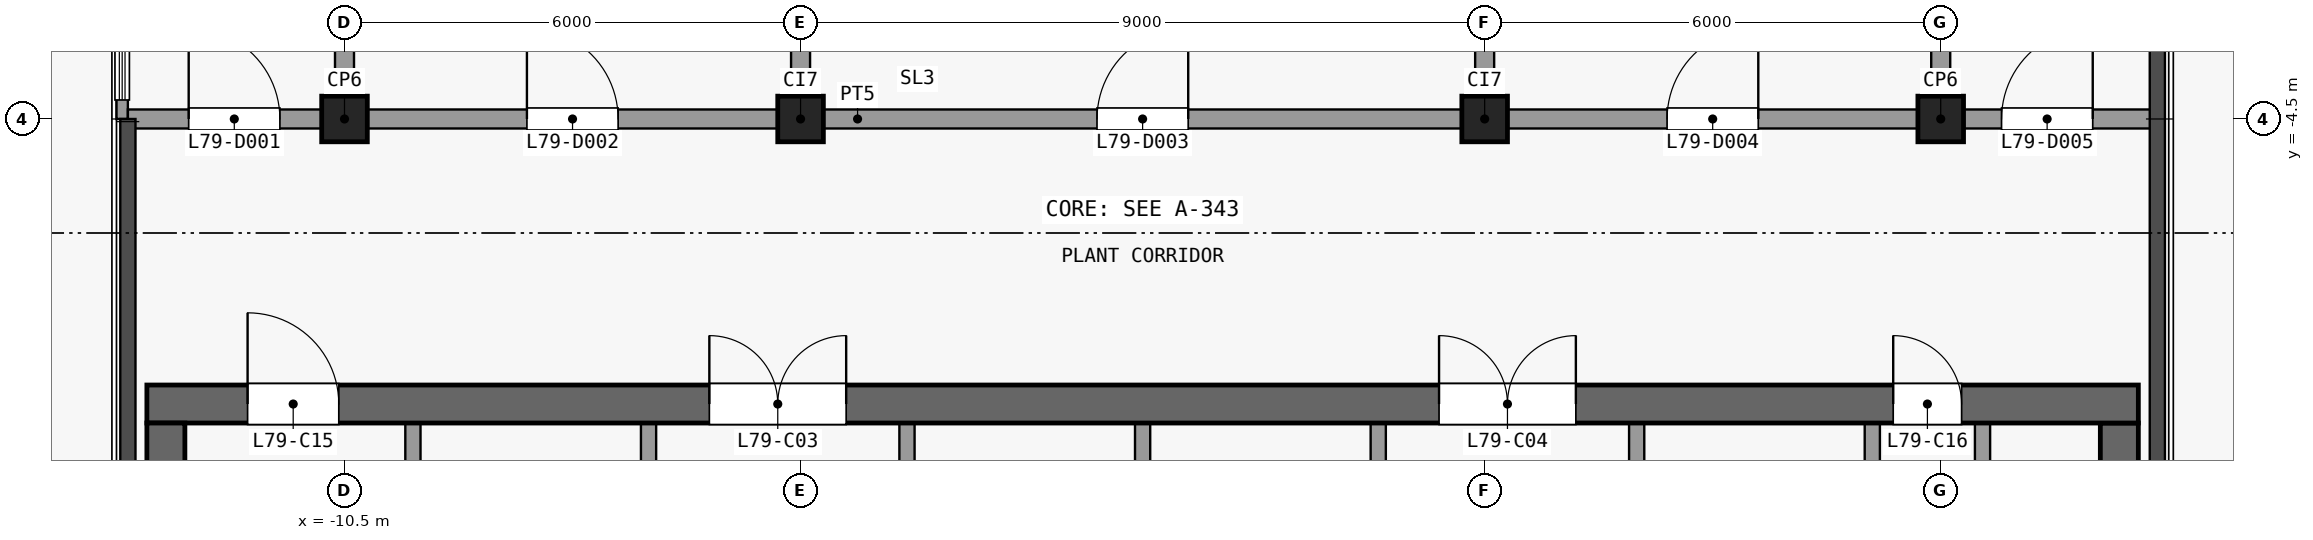
"""IFC4 building model, lengths in metres.
Left out: names, types, materials, properties, quantities, classifications, styles, units other than length and angle.
Written with IfcOpenShell. Run it as: python <this file> out.ifc"""

import sys

from ifc_helpers import new_model, si_unit, direction, frame, frame_2d, origin, origin_2d, place, context, subcontext, project, spatial, rectangle, extrude, element, fill, save


model = new_model("IFC4")
c1 = context("Model", 3, precision=1e-05, world=origin(), true_north=direction((0.0, 1.0)))
c2 = subcontext(c1, "Body", "Model", "MODEL_VIEW")
j1 = project(units=[si_unit("LENGTHUNIT", "METRE"), si_unit("PLANEANGLEUNIT", "RADIAN")], contexts=[c1])
p1 = place(None, origin())
s1 = spatial("IfcSite", under=j1, at=p1, CompositionType="ELEMENT")
p2 = place(p1, origin())
s2 = spatial("IfcBuilding", under=s1, at=p2, CompositionType="ELEMENT")
p3 = place(p2, frame((0.0, 0.0, 312.2)))
s3 = spatial("IfcBuildingStorey", under=s2, at=p3, CompositionType="ELEMENT", Elevation=312.2)
for number, where, z_axis, x_axis in (
    (1, (-10.5, -4.5, 0.0), (0.0, 0.0, 1.0), (1.0, 0.0, 0.0)),
    (2, (-4.5, -4.5, 0.0), (0.0, 0.0, 1.0), (1.0, 0.0, 0.0)),
    (3, (4.5, -4.5, 0.0), (0.0, 0.0, 1.0), (1.0, 0.0, 0.0)),
    (4, (10.5, -4.5, 0.0), (0.0, 0.0, 1.0), (1.0, 0.0, 0.0)),
):
    element("IfcColumn", number, at=place(p3, frame(where, z_axis=z_axis, x_axis=x_axis)), inside=s3, PredefinedType="COLUMN", context=c2, shape_type="SweptSolid", body=[
        extrude(rectangle(XDim=0.6, YDim=0.6, at=origin_2d()), origin(), (0.0, 0.0, 1.0), 4.5),
    ])
p4 = place(p3, frame((-13.1, -8.25, 0.0), z_axis=(0.0, 0.0, 1.0), x_axis=(1.0, 0.0, 0.0)))
e5 = element("IfcWall", 5, at=p4, inside=s3, PredefinedType="SHEAR", context=c2, shape_type="SweptSolid", body=[
    extrude(rectangle(XDim=26.2, YDim=0.5, at=frame_2d((13.1, 0.0))), origin(), (0.0, 0.0, 1.0), 4.2),
])
p5 = place(p4, frame((7.4, 0.0, 0.0)))
e6 = element("IfcOpeningElement", 6, at=p5, cuts=e5, PredefinedType="OPENING", context=c2, shape_type="SweptSolid", body=[
    extrude(rectangle(XDim=1.8, YDim=2.1, at=frame_2d((0.9, 1.05))), frame((0.0, 0.26, 0.0), z_axis=(0.0, -1.0, 0.0), x_axis=(1.0, 0.0, 0.0)), (0.0, 0.0, 1.0), 0.52),
])
p6 = place(p4, frame((17.0, 0.0, 0.0)))
e7 = element("IfcOpeningElement", 7, at=p6, cuts=e5, PredefinedType="OPENING", context=c2, shape_type="SweptSolid", body=[
    extrude(rectangle(XDim=1.8, YDim=2.1, at=frame_2d((0.9, 1.05))), frame((0.0, 0.26, 0.0), z_axis=(0.0, -1.0, 0.0), x_axis=(1.0, 0.0, 0.0)), (0.0, 0.0, 1.0), 0.52),
])
p7 = place(p4, frame((1.325, 0.0, 0.0)))
e8 = element("IfcOpeningElement", 8, at=p7, cuts=e5, PredefinedType="OPENING", context=c2, shape_type="SweptSolid", body=[
    extrude(rectangle(XDim=1.2, YDim=2.1, at=frame_2d((0.6, 1.05))), frame((0.0, 0.26, 0.0), z_axis=(0.0, -1.0, 0.0), x_axis=(1.0, 0.0, 0.0)), (0.0, 0.0, 1.0), 0.52),
])
p8 = place(p4, frame((22.975, 0.0, 0.0)))
e9 = element("IfcOpeningElement", 9, at=p8, cuts=e5, PredefinedType="OPENING", context=c2, shape_type="SweptSolid", body=[
    extrude(rectangle(XDim=0.9, YDim=2.1, at=frame_2d((0.45, 1.05))), frame((0.0, 0.26, 0.0), z_axis=(0.0, -1.0, 0.0), x_axis=(1.0, 0.0, 0.0)), (0.0, 0.0, 1.0), 0.52),
])
for number, where, z_axis, x_axis in (
    (10, (-12.85, -24.6, 0.0), (0.0, 0.0, 1.0), (0.0, 1.0, 0.0)),
    (11, (12.85, -24.6, 0.0), (0.0, 0.0, 1.0), (0.0, 1.0, 0.0)),
):
    element("IfcWall", number, at=place(p3, frame(where, z_axis=z_axis, x_axis=x_axis)), inside=s3, PredefinedType="SHEAR", context=c2, shape_type="SweptSolid", body=[
        extrude(rectangle(XDim=16.1, YDim=0.5, at=frame_2d((8.05, 0.0))), origin(), (0.0, 0.0, 1.0), 4.2),
    ])
p9 = place(p3, frame((-9.6, -16.9, 0.0), z_axis=(0.0, 0.0, 1.0), x_axis=(0.0, 1.0, 0.0)))
e12 = element("IfcWall", 12, at=p9, inside=s3, PredefinedType="PARTITIONING", context=c2, shape_type="SweptSolid", body=[
    extrude(rectangle(XDim=8.4, YDim=0.2, at=frame_2d((4.2, 0.0))), origin(), (0.0, 0.0, 1.0), 4.2),
])
p10 = place(p3, frame((-6.5, -22.5, 0.0), z_axis=(0.0, 0.0, 1.0), x_axis=(0.0, 1.0, 0.0)))
e13 = element("IfcWall", 13, at=p10, inside=s3, PredefinedType="PARTITIONING", context=c2, shape_type="SweptSolid", body=[
    extrude(rectangle(XDim=14.0, YDim=0.2, at=frame_2d((7.0, 0.0))), origin(), (0.0, 0.0, 1.0), 4.2),
])
p11 = place(p10, frame((2.28, 0.0, 0.0)))
e14 = element("IfcOpeningElement", 14, at=p11, cuts=e13, PredefinedType="OPENING", context=c2, shape_type="SweptSolid", body=[
    extrude(rectangle(XDim=1.2, YDim=2.1, at=frame_2d((0.6, 1.05))), frame((0.0, 0.11, 0.0), z_axis=(0.0, -1.0, 0.0), x_axis=(1.0, 0.0, 0.0)), (0.0, 0.0, 1.0), 0.22),
])
p12 = place(p10, frame((9.23, 0.0, 0.0)))
e15 = element("IfcOpeningElement", 15, at=p12, cuts=e13, PredefinedType="OPENING", context=c2, shape_type="SweptSolid", body=[
    extrude(rectangle(XDim=1.2, YDim=2.1, at=frame_2d((0.6, 1.05))), frame((0.0, 0.11, 0.0), z_axis=(0.0, -1.0, 0.0), x_axis=(1.0, 0.0, 0.0)), (0.0, 0.0, 1.0), 0.22),
])
p13 = place(p3, frame((-3.1, -8.5, 0.0), z_axis=(0.0, 0.0, 1.0), x_axis=(0.0, -1.0, 0.0)))
e16 = element("IfcWall", 16, at=p13, inside=s3, PredefinedType="PARTITIONING", context=c2, shape_type="SweptSolid", body=[
    extrude(rectangle(XDim=10.97, YDim=0.2, at=frame_2d((5.485, 0.0))), origin(), (0.0, 0.0, 1.0), 4.2),
])
p14 = place(p13, frame((7.74, 0.0, 0.0)))
e17 = element("IfcOpeningElement", 17, at=p14, cuts=e16, PredefinedType="OPENING", context=c2, shape_type="SweptSolid", body=[
    extrude(rectangle(XDim=1.2, YDim=2.1, at=frame_2d((0.6, 1.05))), frame((0.0, 0.11, 0.0), z_axis=(0.0, -1.0, 0.0), x_axis=(1.0, 0.0, 0.0)), (0.0, 0.0, 1.0), 0.22),
])
p15 = place(p13, frame((2.18, 0.0, 0.0)))
e18 = element("IfcOpeningElement", 18, at=p15, cuts=e16, PredefinedType="OPENING", context=c2, shape_type="SweptSolid", body=[
    extrude(rectangle(XDim=1.2, YDim=2.1, at=frame_2d((0.6, 1.05))), frame((0.0, 0.11, 0.0), z_axis=(0.0, -1.0, 0.0), x_axis=(1.0, 0.0, 0.0)), (0.0, 0.0, 1.0), 0.22),
])
p16 = place(p3, frame((0.0, -19.35, 0.0), z_axis=(0.0, 0.0, 1.0), x_axis=(0.0, 1.0, 0.0)))
e19 = element("IfcWall", 19, at=p16, inside=s3, PredefinedType="PARTITIONING", context=c2, shape_type="SweptSolid", body=[
    extrude(rectangle(XDim=10.85, YDim=0.2, at=frame_2d((5.425, 0.0))), origin(), (0.0, 0.0, 1.0), 4.2),
])
p17 = place(p3, frame((3.1, -19.6, 0.0), z_axis=(0.0, 0.0, 1.0), x_axis=(0.0, 1.0, 0.0)))
e20 = element("IfcWall", 20, at=p17, inside=s3, PredefinedType="PARTITIONING", context=c2, shape_type="SweptSolid", body=[
    extrude(rectangle(XDim=11.1, YDim=0.2, at=frame_2d((5.55, 0.0))), origin(), (0.0, 0.0, 1.0), 4.2),
])
p18 = place(p17, frame((2.25, 0.0, 0.0)))
e21 = element("IfcOpeningElement", 21, at=p18, cuts=e20, PredefinedType="OPENING", context=c2, shape_type="SweptSolid", body=[
    extrude(rectangle(XDim=1.2, YDim=2.1, at=frame_2d((0.6, 1.05))), frame((0.0, 0.11, 0.0), z_axis=(0.0, -1.0, 0.0), x_axis=(1.0, 0.0, 0.0)), (0.0, 0.0, 1.0), 0.22),
])
p19 = place(p17, frame((7.75, 0.0, 0.0)))
e22 = element("IfcOpeningElement", 22, at=p19, cuts=e20, PredefinedType="OPENING", context=c2, shape_type="SweptSolid", body=[
    extrude(rectangle(XDim=1.2, YDim=2.1, at=frame_2d((0.6, 1.05))), frame((0.0, 0.11, 0.0), z_axis=(0.0, -1.0, 0.0), x_axis=(1.0, 0.0, 0.0)), (0.0, 0.0, 1.0), 0.22),
])
p20 = place(p3, frame((6.5, -8.5, 0.0), z_axis=(0.0, 0.0, 1.0), x_axis=(0.0, -1.0, 0.0)))
e23 = element("IfcWall", 23, at=p20, inside=s3, PredefinedType="PARTITIONING", context=c2, shape_type="SweptSolid", body=[
    extrude(rectangle(XDim=10.85, YDim=0.2, at=frame_2d((5.425, 0.0))), origin(), (0.0, 0.0, 1.0), 4.2),
])
p21 = place(p20, frame((6.275, 0.0, 0.0)))
e24 = element("IfcOpeningElement", 24, at=p21, cuts=e23, PredefinedType="OPENING", context=c2, shape_type="SweptSolid", body=[
    extrude(rectangle(XDim=1.2, YDim=2.1, at=frame_2d((0.6, 1.05))), frame((0.0, 0.11, 0.0), z_axis=(0.0, -1.0, 0.0), x_axis=(1.0, 0.0, 0.0)), (0.0, 0.0, 1.0), 0.22),
])
p22 = place(p20, frame((0.925, 0.0, 0.0)))
e25 = element("IfcOpeningElement", 25, at=p22, cuts=e23, PredefinedType="OPENING", context=c2, shape_type="SweptSolid", body=[
    extrude(rectangle(XDim=0.9, YDim=2.1, at=frame_2d((0.45, 1.05))), frame((0.0, 0.11, 0.0), z_axis=(0.0, -1.0, 0.0), x_axis=(1.0, 0.0, 0.0)), (0.0, 0.0, 1.0), 0.22),
])
p23 = place(p3, frame((9.6, -16.9, 0.0), z_axis=(0.0, 0.0, 1.0), x_axis=(0.0, 1.0, 0.0)))
e26 = element("IfcWall", 26, at=p23, inside=s3, PredefinedType="PARTITIONING", context=c2, shape_type="SweptSolid", body=[
    extrude(rectangle(XDim=8.4, YDim=0.2, at=frame_2d((4.2, 0.0))), origin(), (0.0, 0.0, 1.0), 4.2),
])
p24 = place(p3, frame((11.05, -8.5, 0.0), z_axis=(0.0, 0.0, 1.0), x_axis=(0.0, -1.0, 0.0)))
e27 = element("IfcWall", 27, at=p24, inside=s3, PredefinedType="PARTITIONING", context=c2, shape_type="SweptSolid", body=[
    extrude(rectangle(XDim=6.2, YDim=0.2, at=frame_2d((3.1, 0.0))), origin(), (0.0, 0.0, 1.0), 4.2),
])
p25 = place(p24, frame((2.6, 0.0, 0.0)))
e28 = element("IfcOpeningElement", 28, at=p25, cuts=e27, PredefinedType="OPENING", context=c2, shape_type="SweptSolid", body=[
    extrude(rectangle(XDim=0.9, YDim=2.1, at=frame_2d((0.45, 1.05))), frame((0.0, 0.11, 0.0), z_axis=(0.0, -1.0, 0.0), x_axis=(1.0, 0.0, 0.0)), (0.0, 0.0, 1.0), 0.22),
])
p26 = place(p3, frame((-13.425, -4.5, 0.0), z_axis=(0.0, 0.0, 1.0), x_axis=(0.0, 1.0, 0.0)))
e29 = element("IfcWall", 29, at=p26, inside=s3, PredefinedType="SOLIDWALL", context=c2, shape_type="SweptSolid", body=[
    extrude(rectangle(XDim=6.0, YDim=0.15, at=frame_2d((3.0, 0.0))), origin(), (0.0, 0.0, 1.0), 4.2),
])
p27 = place(p26, frame((2.25, 0.0, 0.0)))
e30 = element("IfcOpeningElement", 30, at=p27, cuts=e29, PredefinedType="OPENING", context=c2, shape_type="SweptSolid", body=[
    extrude(rectangle(XDim=1.5, YDim=2.4, at=frame_2d((0.75, 1.2))), frame((0.0, 0.085, 0.0), z_axis=(0.0, -1.0, 0.0), x_axis=(1.0, 0.0, 0.0)), (0.0, 0.0, 1.0), 0.17),
])
p28 = place(p26, frame((0.25, 0.0, 0.9)))
e31 = element("IfcOpeningElement", 31, at=p28, cuts=e29, PredefinedType="OPENING", context=c2, shape_type="SweptSolid", body=[
    extrude(rectangle(XDim=1.75, YDim=2.1, at=frame_2d((0.875, 1.05))), frame((0.0, 0.085, 0.0), z_axis=(0.0, -1.0, 0.0), x_axis=(1.0, 0.0, 0.0)), (0.0, 0.0, 1.0), 0.17),
])
p29 = place(p26, frame((4.0, 0.0, 0.9)))
e32 = element("IfcOpeningElement", 32, at=p29, cuts=e29, PredefinedType="OPENING", context=c2, shape_type="SweptSolid", body=[
    extrude(rectangle(XDim=1.75, YDim=2.1, at=frame_2d((0.875, 1.05))), frame((0.0, 0.085, 0.0), z_axis=(0.0, -1.0, 0.0), x_axis=(1.0, 0.0, 0.0)), (0.0, 0.0, 1.0), 0.17),
])
p30 = place(p3, frame((-13.35, -4.5, 0.0), z_axis=(0.0, 0.0, 1.0), x_axis=(1.0, 0.0, 0.0)))
e33 = element("IfcWall", 33, at=p30, inside=s3, PredefinedType="PARTITIONING", context=c2, shape_type="SweptSolid", body=[
    extrude(rectangle(XDim=26.7, YDim=0.25, at=frame_2d((13.35, 0.0))), origin(), (0.0, 0.0, 1.0), 4.2),
])
p31 = place(p30, frame((0.8, 0.0, 0.0)))
e34 = element("IfcOpeningElement", 34, at=p31, cuts=e33, PredefinedType="OPENING", context=c2, shape_type="SweptSolid", body=[
    extrude(rectangle(XDim=1.2, YDim=2.1, at=frame_2d((0.6, 1.05))), frame((0.0, 0.135, 0.0), z_axis=(0.0, -1.0, 0.0), x_axis=(1.0, 0.0, 0.0)), (0.0, 0.0, 1.0), 0.27),
])
p32 = place(p30, frame((5.25, 0.0, 0.0)))
e35 = element("IfcOpeningElement", 35, at=p32, cuts=e33, PredefinedType="OPENING", context=c2, shape_type="SweptSolid", body=[
    extrude(rectangle(XDim=1.2, YDim=2.1, at=frame_2d((0.6, 1.05))), frame((0.0, 0.135, 0.0), z_axis=(0.0, -1.0, 0.0), x_axis=(1.0, 0.0, 0.0)), (0.0, 0.0, 1.0), 0.27),
])
p33 = place(p30, frame((12.75, 0.0, 0.0)))
e36 = element("IfcOpeningElement", 36, at=p33, cuts=e33, PredefinedType="OPENING", context=c2, shape_type="SweptSolid", body=[
    extrude(rectangle(XDim=1.2, YDim=2.1, at=frame_2d((0.6, 1.05))), frame((0.0, 0.135, 0.0), z_axis=(0.0, -1.0, 0.0), x_axis=(1.0, 0.0, 0.0)), (0.0, 0.0, 1.0), 0.27),
])
p34 = place(p30, frame((20.25, 0.0, 0.0)))
e37 = element("IfcOpeningElement", 37, at=p34, cuts=e33, PredefinedType="OPENING", context=c2, shape_type="SweptSolid", body=[
    extrude(rectangle(XDim=1.2, YDim=2.1, at=frame_2d((0.6, 1.05))), frame((0.0, 0.135, 0.0), z_axis=(0.0, -1.0, 0.0), x_axis=(1.0, 0.0, 0.0)), (0.0, 0.0, 1.0), 0.27),
])
p35 = place(p30, frame((24.65, 0.0, 0.0)))
e38 = element("IfcOpeningElement", 38, at=p35, cuts=e33, PredefinedType="OPENING", context=c2, shape_type="SweptSolid", body=[
    extrude(rectangle(XDim=1.2, YDim=2.1, at=frame_2d((0.6, 1.05))), frame((0.0, 0.135, 0.0), z_axis=(0.0, -1.0, 0.0), x_axis=(1.0, 0.0, 0.0)), (0.0, 0.0, 1.0), 0.27),
])
p36 = place(p3, frame((-10.5, -4.375, 0.0), z_axis=(0.0, 0.0, 1.0), x_axis=(0.0, 1.0, 0.0)))
e39 = element("IfcWall", 39, at=p36, inside=s3, PredefinedType="PARTITIONING", context=c2, shape_type="SweptSolid", body=[
    extrude(rectangle(XDim=9.125, YDim=0.25, at=frame_2d((4.562, 0.0))), origin(), (0.0, 0.0, 1.0), 4.2),
])
for number, where, z_axis, x_axis in (
    (40, (-4.5, -4.375, 0.0), (0.0, 0.0, 1.0), (0.0, 1.0, 0.0)),
    (41, (4.5, -4.375, 0.0), (0.0, 0.0, 1.0), (0.0, 1.0, 0.0)),
):
    element("IfcWall", number, at=place(p3, frame(where, z_axis=z_axis, x_axis=x_axis)), inside=s3, PredefinedType="PARTITIONING", context=c2, shape_type="SweptSolid", body=[
        extrude(rectangle(XDim=14.625, YDim=0.25, at=frame_2d((7.312, 0.0))), origin(), (0.0, 0.0, 1.0), 4.2),
    ])
p37 = place(p3, frame((10.5, -4.375, 0.0), z_axis=(0.0, 0.0, 1.0), x_axis=(0.0, 1.0, 0.0)))
e42 = element("IfcWall", 42, at=p37, inside=s3, PredefinedType="PARTITIONING", context=c2, shape_type="SweptSolid", body=[
    extrude(rectangle(XDim=9.125, YDim=0.25, at=frame_2d((4.562, 0.0))), origin(), (0.0, 0.0, 1.0), 4.2),
])
p38 = place(p5, origin())
e43 = element("IfcDoor", 43, at=p38, inside=s3, OperationType="DOUBLE_DOOR_SINGLE_SWING", PredefinedType="DOOR", context=c2, shape_type="SweptSolid", body=[
    extrude(rectangle(XDim=1.8, YDim=2.1, at=frame_2d((0.9, 1.05))), frame((0.0, 0.025, 0.0), z_axis=(0.0, -1.0, 0.0), x_axis=(1.0, 0.0, 0.0)), (0.0, 0.0, 1.0), 0.05),
])
fill(e6, e43)
p39 = place(p6, origin())
e44 = element("IfcDoor", 44, at=p39, inside=s3, OperationType="DOUBLE_DOOR_SINGLE_SWING", PredefinedType="DOOR", context=c2, shape_type="SweptSolid", body=[
    extrude(rectangle(XDim=1.8, YDim=2.1, at=frame_2d((0.9, 1.05))), frame((0.0, 0.025, 0.0), z_axis=(0.0, -1.0, 0.0), x_axis=(1.0, 0.0, 0.0)), (0.0, 0.0, 1.0), 0.05),
])
fill(e7, e44)
p40 = place(p7, origin())
e45 = element("IfcDoor", 45, at=p40, inside=s3, OperationType="SINGLE_SWING_LEFT", PredefinedType="DOOR", context=c2, shape_type="SweptSolid", body=[
    extrude(rectangle(XDim=1.2, YDim=2.1, at=frame_2d((0.6, 1.05))), frame((0.0, 0.025, 0.0), z_axis=(0.0, -1.0, 0.0), x_axis=(1.0, 0.0, 0.0)), (0.0, 0.0, 1.0), 0.05),
])
fill(e8, e45)
p41 = place(p8, origin())
e46 = element("IfcDoor", 46, at=p41, inside=s3, OperationType="SINGLE_SWING_LEFT", PredefinedType="DOOR", context=c2, shape_type="SweptSolid", body=[
    extrude(rectangle(XDim=0.9, YDim=2.1, at=frame_2d((0.45, 1.05))), frame((0.0, 0.025, 0.0), z_axis=(0.0, -1.0, 0.0), x_axis=(1.0, 0.0, 0.0)), (0.0, 0.0, 1.0), 0.05),
])
fill(e9, e46)
p42 = place(p28, origin())
e47 = element("IfcWindow", 47, at=p42, inside=s3, PartitioningType="SINGLE_PANEL", PredefinedType="WINDOW", context=c2, shape_type="SweptSolid", body=[
    extrude(rectangle(XDim=1.75, YDim=2.1, at=frame_2d((0.875, 1.05))), frame((0.0, 0.03, 0.0), z_axis=(0.0, -1.0, 0.0), x_axis=(1.0, 0.0, 0.0)), (0.0, 0.0, 1.0), 0.06),
])
fill(e31, e47)
p43 = place(p31, origin())
e48 = element("IfcDoor", 48, at=p43, inside=s3, OperationType="SINGLE_SWING_RIGHT", PredefinedType="DOOR", context=c2, shape_type="SweptSolid", body=[
    extrude(rectangle(XDim=1.2, YDim=2.1, at=frame_2d((0.6, 1.05))), frame((0.0, 0.025, 0.0), z_axis=(0.0, -1.0, 0.0), x_axis=(1.0, 0.0, 0.0)), (0.0, 0.0, 1.0), 0.05),
])
fill(e34, e48)
p44 = place(p32, origin())
e49 = element("IfcDoor", 49, at=p44, inside=s3, OperationType="SINGLE_SWING_RIGHT", PredefinedType="DOOR", context=c2, shape_type="SweptSolid", body=[
    extrude(rectangle(XDim=1.2, YDim=2.1, at=frame_2d((0.6, 1.05))), frame((0.0, 0.025, 0.0), z_axis=(0.0, -1.0, 0.0), x_axis=(1.0, 0.0, 0.0)), (0.0, 0.0, 1.0), 0.05),
])
fill(e35, e49)
p45 = place(p33, origin())
e50 = element("IfcDoor", 50, at=p45, inside=s3, OperationType="SINGLE_SWING_LEFT", PredefinedType="DOOR", context=c2, shape_type="SweptSolid", body=[
    extrude(rectangle(XDim=1.2, YDim=2.1, at=frame_2d((0.6, 1.05))), frame((0.0, 0.025, 0.0), z_axis=(0.0, -1.0, 0.0), x_axis=(1.0, 0.0, 0.0)), (0.0, 0.0, 1.0), 0.05),
])
fill(e36, e50)
p46 = place(p34, origin())
e51 = element("IfcDoor", 51, at=p46, inside=s3, OperationType="SINGLE_SWING_LEFT", PredefinedType="DOOR", context=c2, shape_type="SweptSolid", body=[
    extrude(rectangle(XDim=1.2, YDim=2.1, at=frame_2d((0.6, 1.05))), frame((0.0, 0.025, 0.0), z_axis=(0.0, -1.0, 0.0), x_axis=(1.0, 0.0, 0.0)), (0.0, 0.0, 1.0), 0.05),
])
fill(e37, e51)
p47 = place(p35, origin())
e52 = element("IfcDoor", 52, at=p47, inside=s3, OperationType="SINGLE_SWING_LEFT", PredefinedType="DOOR", context=c2, shape_type="SweptSolid", body=[
    extrude(rectangle(XDim=1.2, YDim=2.1, at=frame_2d((0.6, 1.05))), frame((0.0, 0.025, 0.0), z_axis=(0.0, -1.0, 0.0), x_axis=(1.0, 0.0, 0.0)), (0.0, 0.0, 1.0), 0.05),
])
fill(e38, e52)
save(model, sys.argv[1])
